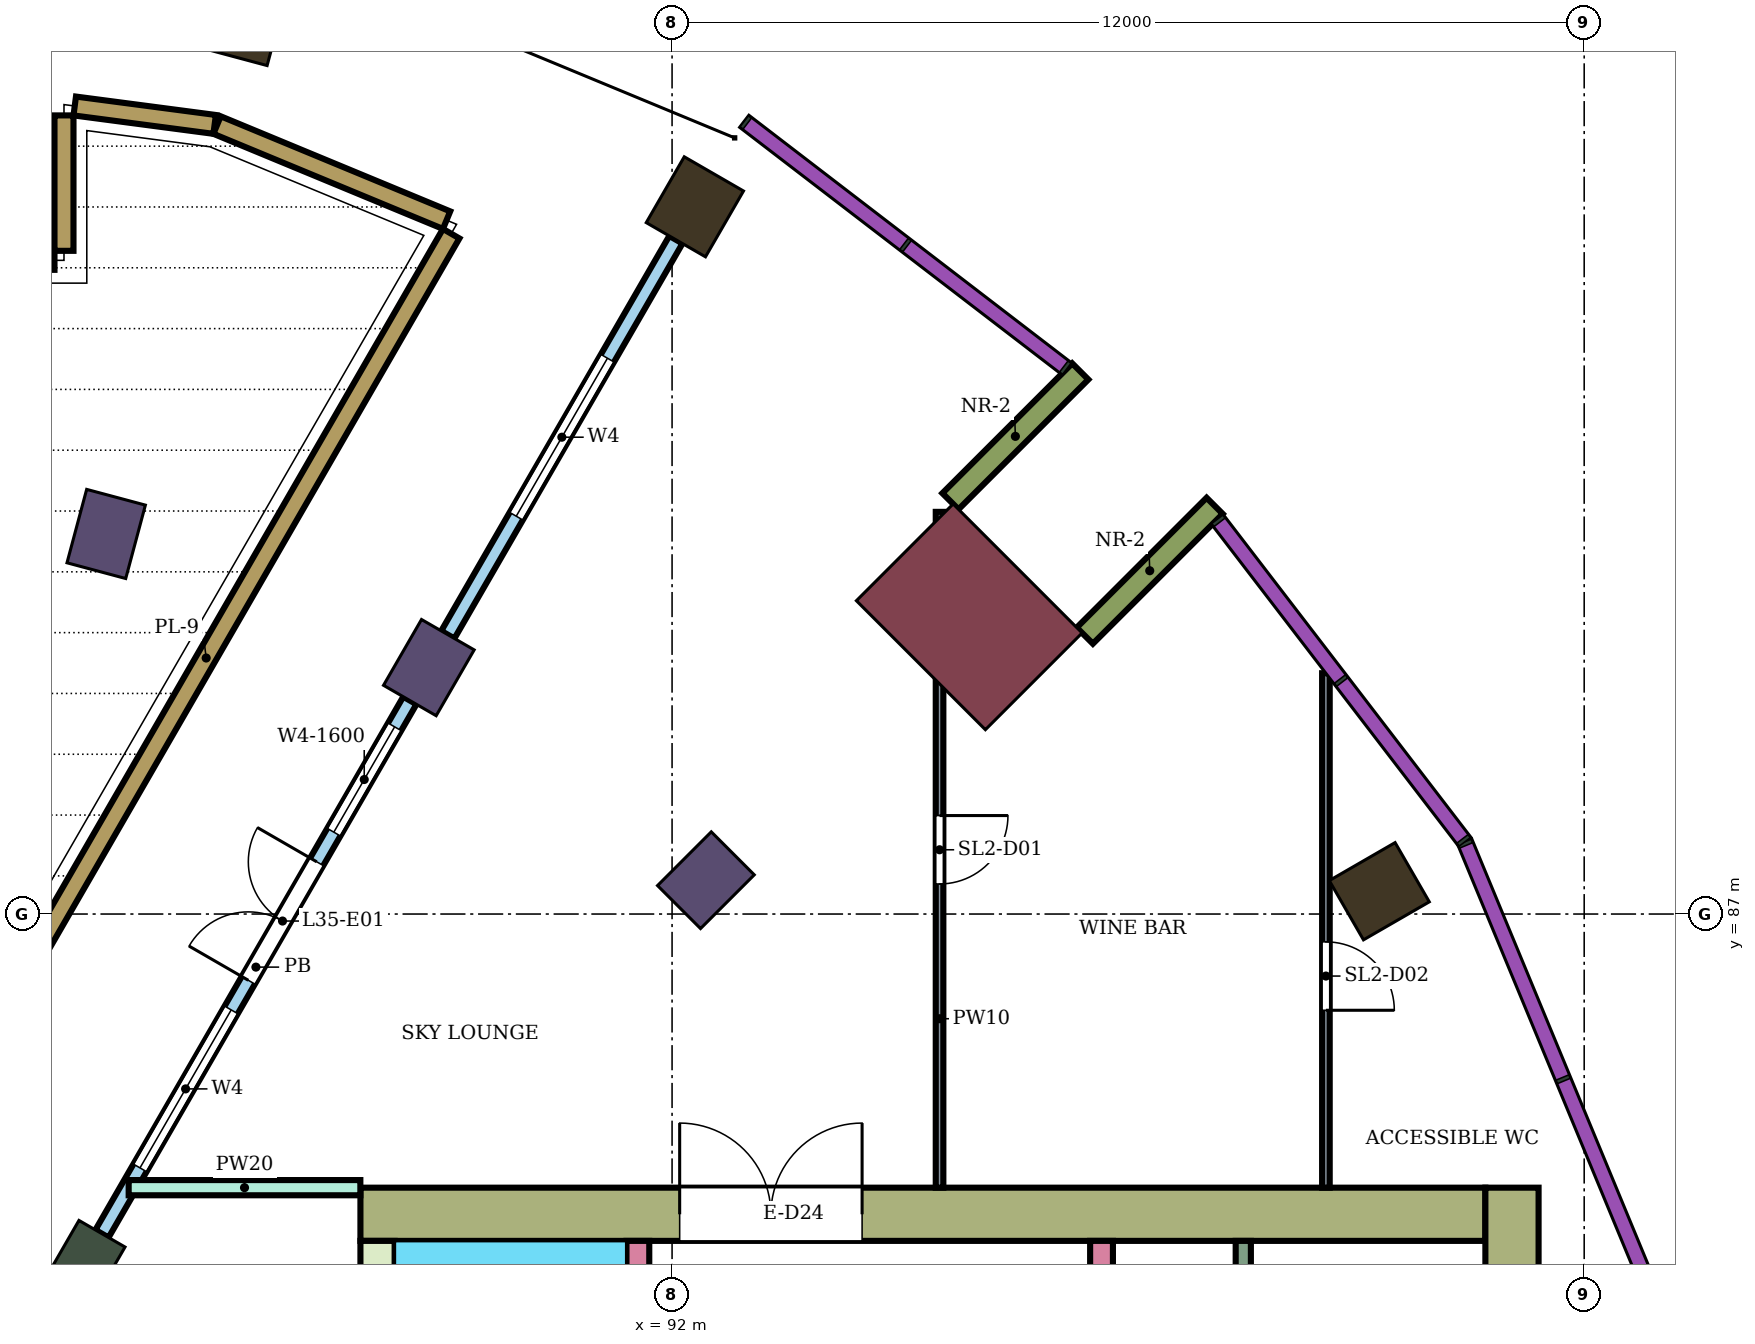
"""IFC4 building model, lengths in metres.
Left out: names, types, materials, properties, quantities, classifications, styles, units other than length and angle.
Written with IfcOpenShell. Run it as: python <this file> out.ifc"""

import sys

from ifc_helpers import new_model, si_unit, direction, frame, frame_2d, origin, origin_2d, place, context, subcontext, project, spatial, rectangle, extrude, element, fill, save


model = new_model("IFC4")
c1 = context("Model", 3, precision=1e-05, world=origin(), true_north=direction((0.0, 1.0)))
c2 = subcontext(c1, "Body", "Model", "MODEL_VIEW")
j1 = project(units=[si_unit("LENGTHUNIT", "METRE"), si_unit("PLANEANGLEUNIT", "RADIAN")], contexts=[c1])
p1 = place(None, origin())
s1 = spatial("IfcSite", under=j1, at=p1, CompositionType="ELEMENT")
p2 = place(p1, origin())
s2 = spatial("IfcBuilding", under=s1, at=p2, CompositionType="ELEMENT")
p3 = place(p2, frame((0.0, 0.0, 149.7)))
s3 = spatial("IfcBuildingStorey", under=s2, at=p3, CompositionType="ELEMENT", Elevation=149.7)
for number, where, z_axis, x_axis in (
    (1, (101.304, 87.3, 0.0), (0.0, 0.0, 1.0), (0.866, 0.5, 0.0)),
    (2, (92.3, 96.304, 0.0), (0.0, 0.0, 1.0), (0.5, 0.866, 0.0)),
    (3, (86.367, 98.762, 0.0), (0.0, 0.0, 1.0), (0.259, 0.966, 0.0)),
):
    element("IfcColumn", number, at=place(p3, frame(where, z_axis=z_axis, x_axis=x_axis)), inside=s3, PredefinedType="COLUMN", context=c2, shape_type="SweptSolid", body=[
        extrude(rectangle(XDim=1.0, YDim=0.9, at=origin_2d()), origin(), (0.0, 0.0, 1.0), 8.0),
    ])
for number, where, z_axis, x_axis in (
    (4, (92.445, 87.445, 0.0), (0.0, 0.0, 1.0), (0.707, 0.707, 0.0)),
    (5, (88.8, 90.242, 0.0), (0.0, 0.0, 1.0), (0.5, 0.866, 0.0)),
    (6, (84.555, 92.0, 0.0), (0.0, 0.0, 1.0), (0.259, 0.966, 0.0)),
):
    element("IfcColumn", number, at=place(p3, frame(where, z_axis=z_axis, x_axis=x_axis)), inside=s3, PredefinedType="COLUMN", context=c2, shape_type="SweptSolid", body=[
        extrude(rectangle(XDim=1.0, YDim=0.8, at=origin_2d()), origin(), (0.0, 0.0, 1.0), 8.0),
    ])
p4 = place(p3, frame((84.3, 82.448, 0.0), z_axis=(0.0, 0.0, 1.0), x_axis=(0.5, 0.866025403784, 0.0)))
e7 = element("IfcColumn", 7, at=p4, inside=s3, PredefinedType="COLUMN", context=c2, shape_type="SweptSolid", body=[
    extrude(rectangle(XDim=0.8, YDim=0.7, at=origin_2d()), origin(), (0.0, 0.0, 1.0), 8.0),
])
p5 = place(p3, frame((95.91, 90.91, 0.0), z_axis=(0.0, 0.0, 1.0), x_axis=(0.707106781187, 0.707106781187, 0.0)))
e8 = element("IfcColumn", 8, at=p5, inside=s3, PredefinedType="COLUMN", context=c2, shape_type="SweptSolid", body=[
    extrude(rectangle(XDim=1.8, YDim=2.4, at=origin_2d()), origin(), (0.0, 0.0, 1.0), 8.0),
])
p6 = place(p3, frame((87.9, 83.05, 0.0), z_axis=(0.0, 0.0, 1.0), x_axis=(1.0, 0.0, 0.0)))
e9 = element("IfcWall", 9, at=p6, inside=s3, PredefinedType="SHEAR", context=c2, shape_type="SweptSolid", body=[
    extrude(rectangle(XDim=14.8, YDim=0.7, at=frame_2d((7.4, 0.0))), origin(), (0.0, 0.0, 1.0), 7.68),
])
p7 = place(p6, frame((4.2, 0.0, 0.0)))
e10 = element("IfcOpeningElement", 10, at=p7, cuts=e9, PredefinedType="OPENING", context=c2, shape_type="SweptSolid", body=[
    extrude(rectangle(XDim=2.4, YDim=2.4, at=frame_2d((1.2, 1.2))), frame((0.0, 0.36, 0.0), z_axis=(0.0, -1.0, 0.0), x_axis=(1.0, 0.0, 0.0)), (0.0, 0.0, 1.0), 0.72),
])
p8 = place(p3, frame((88.125, 75.0, 0.0), z_axis=(0.0, 0.0, 1.0), x_axis=(0.0, 1.0, 0.0)))
e11 = element("IfcWall", 11, at=p8, inside=s3, PredefinedType="SHEAR", context=c2, shape_type="SweptSolid", body=[
    extrude(rectangle(XDim=7.7, YDim=0.45, at=frame_2d((3.85, 0.0))), origin(), (0.0, 0.0, 1.0), 7.68),
])
p9 = place(p3, frame((103.05, 66.6, 0.0), z_axis=(0.0, 0.0, 1.0), x_axis=(0.0, 1.0, 0.0)))
e12 = element("IfcWall", 12, at=p9, inside=s3, PredefinedType="SHEAR", context=c2, shape_type="SweptSolid", body=[
    extrude(rectangle(XDim=16.8, YDim=0.7, at=frame_2d((8.4, 0.0))), origin(), (0.0, 0.0, 1.0), 7.68),
])
p10 = place(p3, frame((91.55, 75.0, 0.0), z_axis=(0.0, 0.0, 1.0), x_axis=(0.0, 1.0, 0.0)))
e13 = element("IfcWall", 13, at=p10, inside=s3, PredefinedType="SHEAR", context=c2, shape_type="SweptSolid", body=[
    extrude(rectangle(XDim=7.7, YDim=0.3, at=frame_2d((3.85, 0.0))), origin(), (0.0, 0.0, 1.0), 7.68),
])
p11 = place(p10, frame((1.85, 0.0, 0.0)))
e14 = element("IfcOpeningElement", 14, at=p11, cuts=e13, PredefinedType="OPENING", context=c2, shape_type="SweptSolid", body=[
    extrude(rectangle(XDim=0.9, YDim=2.1, at=frame_2d((0.45, 1.05))), frame((0.0, 0.16, 0.0), z_axis=(0.0, -1.0, 0.0), x_axis=(1.0, 0.0, 0.0)), (0.0, 0.0, 1.0), 0.32),
])
p12 = place(p3, frame((97.65, 78.6, 0.0), z_axis=(0.0, 0.0, 1.0), x_axis=(0.0, 1.0, 0.0)))
e15 = element("IfcWall", 15, at=p12, inside=s3, PredefinedType="SHEAR", context=c2, shape_type="SweptSolid", body=[
    extrude(rectangle(XDim=4.1, YDim=0.3, at=frame_2d((2.05, 0.0))), origin(), (0.0, 0.0, 1.0), 7.68),
])
for number, where, z_axis, x_axis in (
    (16, (97.43, 90.662, 0.0), (0.0, 0.0, 1.0), (0.707, 0.707, 0.0)),
    (17, (95.662, 92.43, 0.0), (0.0, 0.0, 1.0), (0.707, 0.707, 0.0)),
):
    element("IfcWall", number, at=place(p3, frame(where, z_axis=z_axis, x_axis=x_axis)), inside=s3, PredefinedType="NOTDEFINED", context=c2, shape_type="SweptSolid", body=[
        extrude(rectangle(XDim=2.416, YDim=0.3, at=frame_2d((1.208, 0.0))), origin(), (0.0, 0.0, 1.0), 8.0),
    ])
p13 = place(p3, frame((82.647, 84.785, 0.0), z_axis=(0.0, 0.0, 1.0), x_axis=(0.499992370413, 0.866029808684, 0.0)))
e18 = element("IfcWall", 18, at=p13, inside=s3, PredefinedType="USERDEFINED", context=c2, shape_type="SweptSolid", body=[
    extrude(rectangle(XDim=12.893, YDim=0.25, at=frame_2d((6.446, 0.0))), origin(), (0.0, 0.0, 1.0), 0.6),
])
p14 = place(p3, frame((89.033, 96.129, 0.0), z_axis=(0.0, 0.0, 1.0), x_axis=(-0.923863886655, 0.382721202621, 0.0)))
e19 = element("IfcWall", 19, at=p14, inside=s3, PredefinedType="USERDEFINED", context=c2, shape_type="SweptSolid", body=[
    extrude(rectangle(XDim=3.269, YDim=0.25, at=frame_2d((1.634, 0.0))), origin(), (0.0, 0.0, 1.0), 0.6),
])
p15 = place(p3, frame((85.982, 97.388, 0.0), z_axis=(0.0, 0.0, 1.0), x_axis=(-0.991436829887, 0.130587182926, 0.0)))
e20 = element("IfcWall", 20, at=p15, inside=s3, PredefinedType="USERDEFINED", context=c2, shape_type="SweptSolid", body=[
    extrude(rectangle(XDim=1.856, YDim=0.25, at=frame_2d((0.928, 0.0))), origin(), (0.0, 0.0, 1.0), 0.6),
])
p16 = place(p3, frame((84.0, 97.507, 0.0), z_axis=(0.0, 0.0, 1.0), x_axis=(0.0, -1.0, 0.0)))
e21 = element("IfcWall", 21, at=p16, inside=s3, PredefinedType="USERDEFINED", context=c2, shape_type="SweptSolid", body=[
    extrude(rectangle(XDim=1.781, YDim=0.25, at=frame_2d((0.891, 0.0))), origin(), (0.0, 0.0, 1.0), 0.6),
])
p17 = place(p3, frame((83.875, 95.6, 0.0), z_axis=(0.0, 0.0, 1.0), x_axis=(-1.0, 0.0, 0.0)))
e22 = element("IfcWall", 22, at=p17, inside=s3, PredefinedType="USERDEFINED", context=c2, shape_type="SweptSolid", body=[
    extrude(rectangle(XDim=7.75, YDim=0.25, at=frame_2d((3.875, 0.0))), origin(), (0.0, 0.0, 1.0), 0.6),
])
p18 = place(p3, frame((84.5, 82.794, 0.0), z_axis=(0.0, 0.0, 1.0), x_axis=(0.499999880539, 0.866025472755, 0.0)))
e23 = element("IfcWall", 23, at=p18, inside=s3, PredefinedType="NOTDEFINED", context=c2, shape_type="SweptSolid", body=[
    extrude(rectangle(XDim=8.1, YDim=0.2, at=frame_2d((4.05, 0.0))), origin(), (0.0, 0.0, 1.0), 8.0),
])
p19 = place(p18, frame((1.0, 0.0, 0.3)))
e24 = element("IfcOpeningElement", 24, at=p19, cuts=e23, PredefinedType="OPENING", context=c2, shape_type="SweptSolid", body=[
    extrude(rectangle(XDim=2.4, YDim=3.6, at=frame_2d((1.2, 1.8))), frame((0.0, 0.11, 0.0), z_axis=(0.0, -1.0, 0.0), x_axis=(1.0, 0.0, 0.0)), (0.0, 0.0, 1.0), 0.22),
])
p20 = place(p18, frame((3.85, 0.0, 0.0)))
e25 = element("IfcOpeningElement", 25, at=p20, cuts=e23, PredefinedType="OPENING", context=c2, shape_type="SweptSolid", body=[
    extrude(rectangle(XDim=1.8, YDim=2.4, at=frame_2d((0.9, 1.2))), frame((0.0, 0.11, 0.0), z_axis=(0.0, -1.0, 0.0), x_axis=(1.0, 0.0, 0.0)), (0.0, 0.0, 1.0), 0.22),
])
p21 = place(p18, frame((6.1, 0.0, 0.3)))
e26 = element("IfcOpeningElement", 26, at=p21, cuts=e23, PredefinedType="OPENING", context=c2, shape_type="SweptSolid", body=[
    extrude(rectangle(XDim=1.6, YDim=3.6, at=frame_2d((0.8, 1.8))), frame((0.0, 0.11, 0.0), z_axis=(0.0, -1.0, 0.0), x_axis=(1.0, 0.0, 0.0)), (0.0, 0.0, 1.0), 0.22),
])
p22 = place(p3, frame((89.05, 90.675, 0.0), z_axis=(0.0, 0.0, 1.0), x_axis=(0.500007758305, 0.866020924479, 0.0)))
e27 = element("IfcWall", 27, at=p22, inside=s3, PredefinedType="NOTDEFINED", context=c2, shape_type="SweptSolid", body=[
    extrude(rectangle(XDim=6.0, YDim=0.2, at=frame_2d((3.0, 0.0))), origin(), (0.0, 0.0, 1.0), 8.0),
])
p23 = place(p22, frame((1.8, 0.0, 0.3)))
e28 = element("IfcOpeningElement", 28, at=p23, cuts=e27, PredefinedType="OPENING", context=c2, shape_type="SweptSolid", body=[
    extrude(rectangle(XDim=2.4, YDim=3.6, at=frame_2d((1.2, 1.8))), frame((0.0, 0.11, 0.0), z_axis=(0.0, -1.0, 0.0), x_axis=(1.0, 0.0, 0.0)), (0.0, 0.0, 1.0), 0.22),
])
p24 = place(p3, frame((84.851, 83.4, 0.0), z_axis=(0.0, 0.0, 1.0), x_axis=(1.0, 0.0, 0.0)))
e29 = element("IfcWall", 29, at=p24, inside=s3, PredefinedType="PARTITIONING", context=c2, shape_type="SweptSolid", body=[
    extrude(rectangle(XDim=3.048, YDim=0.2, at=frame_2d((1.524, 0.0))), origin(), (0.0, 0.0, 1.0), 7.55),
])
p25 = place(p3, frame((95.519, 83.4, 0.0), z_axis=(0.0, 0.0, 1.0), x_axis=(0.0, 1.0, 0.0)))
e30 = element("IfcWall", 30, at=p25, inside=s3, PredefinedType="PARTITIONING", context=c2, shape_type="SweptSolid", body=[
    extrude(rectangle(XDim=8.891, YDim=0.1, at=frame_2d((4.446, 0.0))), origin(), (0.0, 0.0, 1.0), 7.55),
])
p26 = place(p25, frame((3.996, 0.0, 0.0)))
e31 = element("IfcOpeningElement", 31, at=p26, cuts=e30, PredefinedType="OPENING", context=c2, shape_type="SweptSolid", body=[
    extrude(rectangle(XDim=0.9, YDim=2.1, at=frame_2d((0.45, 1.05))), frame((0.0, 0.06, 0.0), z_axis=(0.0, -1.0, 0.0), x_axis=(1.0, 0.0, 0.0)), (0.0, 0.0, 1.0), 0.12),
])
p27 = place(p3, frame((100.602, 83.4, 0.0), z_axis=(0.0, 0.0, 1.0), x_axis=(0.0, 1.0, 0.0)))
e32 = element("IfcWall", 32, at=p27, inside=s3, PredefinedType="PARTITIONING", context=c2, shape_type="SweptSolid", body=[
    extrude(rectangle(XDim=6.768, YDim=0.1, at=frame_2d((3.384, 0.0))), origin(), (0.0, 0.0, 1.0), 7.55),
])
p28 = place(p27, frame((2.334, 0.0, 0.0)))
e33 = element("IfcOpeningElement", 33, at=p28, cuts=e32, PredefinedType="OPENING", context=c2, shape_type="SweptSolid", body=[
    extrude(rectangle(XDim=0.9, YDim=2.1, at=frame_2d((0.45, 1.05))), frame((0.0, 0.06, 0.0), z_axis=(0.0, -1.0, 0.0), x_axis=(1.0, 0.0, 0.0)), (0.0, 0.0, 1.0), 0.12),
])
p29 = place(p3, frame((99.515, 78.9, 0.0), z_axis=(0.0, 0.0, 1.0), x_axis=(0.0, 1.0, 0.0)))
e34 = element("IfcWall", 34, at=p29, inside=s3, PredefinedType="PARTITIONING", context=c2, shape_type="SweptSolid", body=[
    extrude(rectangle(XDim=3.8, YDim=0.2, at=frame_2d((1.9, 0.0))), origin(), (0.0, 0.0, 1.0), 7.68),
])
p30 = place(p19, origin())
e35 = element("IfcWindow", 35, at=p30, inside=s3, PartitioningType="SINGLE_PANEL", PredefinedType="WINDOW", context=c2, shape_type="SweptSolid", body=[
    extrude(rectangle(XDim=2.4, YDim=3.6, at=frame_2d((1.2, 1.8))), frame((0.0, 0.03, 0.0), z_axis=(0.0, -1.0, 0.0), x_axis=(1.0, 0.0, 0.0)), (0.0, 0.0, 1.0), 0.06),
])
fill(e24, e35)
p31 = place(p20, origin())
e36 = element("IfcDoor", 36, at=p31, inside=s3, OperationType="DOUBLE_DOOR_SINGLE_SWING", PredefinedType="DOOR", context=c2, shape_type="SweptSolid", body=[
    extrude(rectangle(XDim=1.8, YDim=2.4, at=frame_2d((0.9, 1.2))), frame((0.0, 0.025, 0.0), z_axis=(0.0, -1.0, 0.0), x_axis=(1.0, 0.0, 0.0)), (0.0, 0.0, 1.0), 0.05),
])
fill(e25, e36)
p32 = place(p21, origin())
e37 = element("IfcWindow", 37, at=p32, inside=s3, PartitioningType="SINGLE_PANEL", PredefinedType="WINDOW", context=c2, shape_type="SweptSolid", body=[
    extrude(rectangle(XDim=1.6, YDim=3.6, at=frame_2d((0.8, 1.8))), frame((0.0, 0.03, 0.0), z_axis=(0.0, -1.0, 0.0), x_axis=(1.0, 0.0, 0.0)), (0.0, 0.0, 1.0), 0.06),
])
fill(e26, e37)
p33 = place(p23, origin())
e38 = element("IfcWindow", 38, at=p33, inside=s3, PartitioningType="SINGLE_PANEL", PredefinedType="WINDOW", context=c2, shape_type="SweptSolid", body=[
    extrude(rectangle(XDim=2.4, YDim=3.6, at=frame_2d((1.2, 1.8))), frame((0.0, 0.03, 0.0), z_axis=(0.0, -1.0, 0.0), x_axis=(1.0, 0.0, 0.0)), (0.0, 0.0, 1.0), 0.06),
])
fill(e28, e38)
p34 = place(p26, frame((0.9, 0.0, 0.0), z_axis=(0.0, 0.0, 1.0), x_axis=(-1.0, 0.0, 0.0)))
e39 = element("IfcDoor", 39, at=p34, inside=s3, OperationType="SINGLE_SWING_LEFT", PredefinedType="DOOR", context=c2, shape_type="SweptSolid", body=[
    extrude(rectangle(XDim=0.9, YDim=2.1, at=frame_2d((0.45, 1.05))), frame((0.0, 0.025, 0.0), z_axis=(0.0, -1.0, 0.0), x_axis=(1.0, 0.0, 0.0)), (0.0, 0.0, 1.0), 0.05),
])
fill(e31, e39)
p35 = place(p28, frame((0.9, 0.0, 0.0), z_axis=(0.0, 0.0, 1.0), x_axis=(-1.0, 0.0, 0.0)))
e40 = element("IfcDoor", 40, at=p35, inside=s3, OperationType="SINGLE_SWING_RIGHT", PredefinedType="DOOR", context=c2, shape_type="SweptSolid", body=[
    extrude(rectangle(XDim=0.9, YDim=2.1, at=frame_2d((0.45, 1.05))), frame((0.0, 0.025, 0.0), z_axis=(0.0, -1.0, 0.0), x_axis=(1.0, 0.0, 0.0)), (0.0, 0.0, 1.0), 0.05),
])
fill(e33, e40)
p36 = place(p7, origin())
e41 = element("IfcDoor", 41, at=p36, inside=s3, OperationType="DOUBLE_DOOR_SINGLE_SWING", PredefinedType="DOOR", context=c2, shape_type="SweptSolid", body=[
    extrude(rectangle(XDim=2.4, YDim=2.4, at=frame_2d((1.2, 1.2))), frame((0.0, 0.025, 0.0), z_axis=(0.0, -1.0, 0.0), x_axis=(1.0, 0.0, 0.0)), (0.0, 0.0, 1.0), 0.05),
])
fill(e10, e41)
save(model, sys.argv[1])
